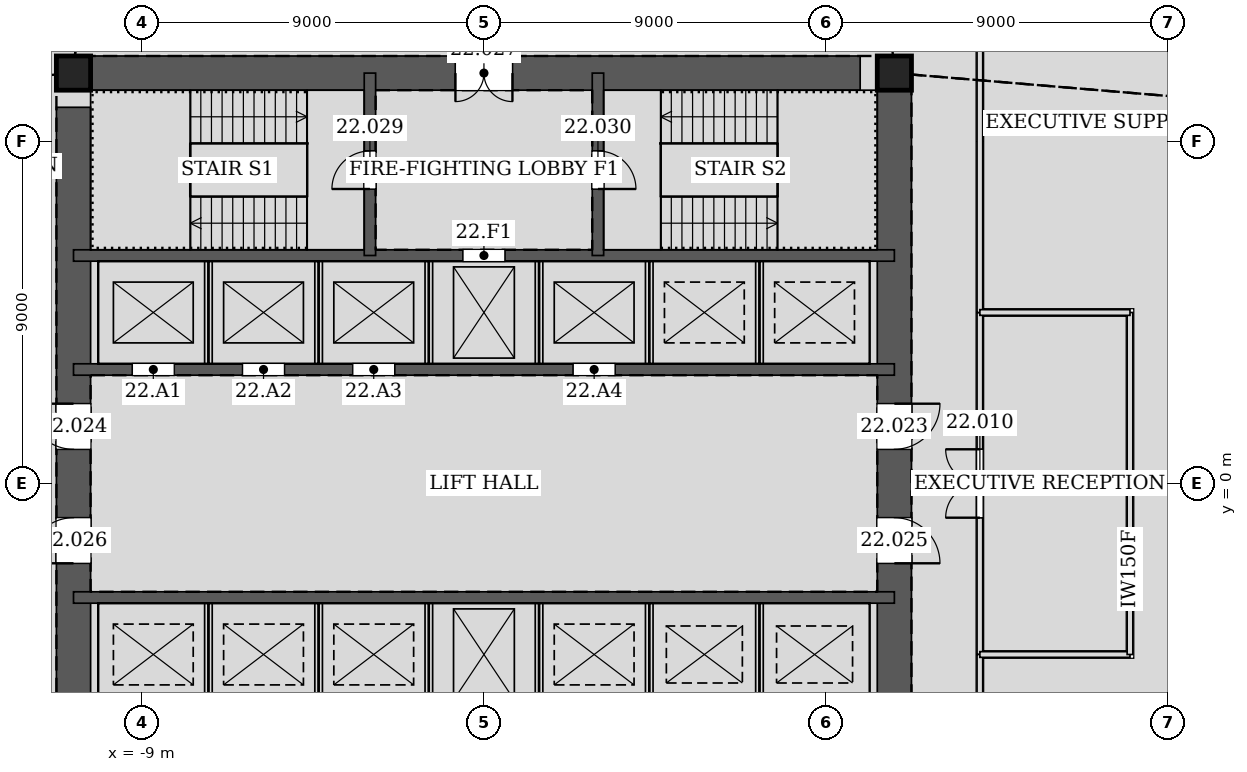
"""IFC4 building model, lengths in metres.
Left out: names, types, materials, properties, quantities, classifications, styles, units other than length and angle.
Written with IfcOpenShell. Run it as: python <this file> out.ifc"""

import sys

from ifc_helpers import new_model, si_unit, direction, frame, frame_2d, origin, origin_2d, place, context, subcontext, project, spatial, rectangle, hollow_rectangle, extrude, element, fill, save


model = new_model("IFC4")
c1 = context("Model", 3, precision=1e-05, world=origin(), true_north=direction((0.0, 1.0)))
c2 = subcontext(c1, "Body", "Model", "MODEL_VIEW")
j1 = project(units=[si_unit("LENGTHUNIT", "METRE"), si_unit("PLANEANGLEUNIT", "RADIAN")], contexts=[c1])
p1 = place(None, origin())
s1 = spatial("IfcSite", under=j1, at=p1, CompositionType="ELEMENT")
p2 = place(p1, origin())
s2 = spatial("IfcBuilding", under=s1, at=p2, CompositionType="ELEMENT")
p3 = place(p2, frame((0.0, 0.0, 100.2)))
s3 = spatial("IfcBuildingStorey", under=s2, at=p3, CompositionType="ELEMENT", Elevation=100.2)
for number, where, z_axis, x_axis in (
    (1, (10.8, 10.8, 0.0), (0.0, 0.0, 1.0), (1.0, 0.0, 0.0)),
    (2, (-10.8, 10.8, 0.0), (0.0, 0.0, 1.0), (1.0, 0.0, 0.0)),
):
    element("IfcColumn", number, at=place(p3, frame(where, z_axis=z_axis, x_axis=x_axis)), inside=s3, PredefinedType="COLUMN", context=c2, shape_type="SweptSolid", body=[
        extrude(hollow_rectangle(XDim=0.9, YDim=0.9, WallThickness=0.06, at=origin_2d()), origin(), (0.0, 0.0, 1.0), 4.2),
    ])
p4 = place(p3, frame((10.8, -10.8, 0.0), z_axis=(0.0, 0.0, 1.0), x_axis=(0.0, 1.0, 0.0)))
e3 = element("IfcWall", 3, at=p4, inside=s3, PredefinedType="SOLIDWALL", context=c2, shape_type="SweptSolid", body=[
    extrude(rectangle(XDim=21.6, YDim=0.9, at=frame_2d((10.8, 0.0))), origin(), (0.0, 0.0, 1.0), 4.2),
])
p5 = place(p4, frame((11.7, 0.0, 0.0)))
e4 = element("IfcOpeningElement", 4, at=p5, cuts=e3, PredefinedType="OPENING", context=c2, shape_type="SweptSolid", body=[
    extrude(rectangle(XDim=1.2, YDim=2.1, at=frame_2d((0.6, 1.05))), frame((0.0, 0.46, 0.0), z_axis=(0.0, -1.0, 0.0), x_axis=(1.0, 0.0, 0.0)), (0.0, 0.0, 1.0), 0.92),
])
p6 = place(p4, frame((8.7, 0.0, 0.0)))
e5 = element("IfcOpeningElement", 5, at=p6, cuts=e3, PredefinedType="OPENING", context=c2, shape_type="SweptSolid", body=[
    extrude(rectangle(XDim=1.2, YDim=2.1, at=frame_2d((0.6, 1.05))), frame((0.0, 0.46, 0.0), z_axis=(0.0, -1.0, 0.0), x_axis=(1.0, 0.0, 0.0)), (0.0, 0.0, 1.0), 0.92),
])
p7 = place(p3, frame((10.8, 10.8, 0.0), z_axis=(0.0, 0.0, 1.0), x_axis=(-1.0, 0.0, 0.0)))
e6 = element("IfcWall", 6, at=p7, inside=s3, PredefinedType="SOLIDWALL", context=c2, shape_type="SweptSolid", body=[
    extrude(rectangle(XDim=21.6, YDim=0.9, at=frame_2d((10.8, 0.0))), origin(), (0.0, 0.0, 1.0), 4.2),
])
p8 = place(p7, frame((10.05, 0.0, 0.0)))
e7 = element("IfcOpeningElement", 7, at=p8, cuts=e6, PredefinedType="OPENING", context=c2, shape_type="SweptSolid", body=[
    extrude(rectangle(XDim=1.5, YDim=2.1, at=frame_2d((0.75, 1.05))), frame((0.0, 0.46, 0.0), z_axis=(0.0, -1.0, 0.0), x_axis=(1.0, 0.0, 0.0)), (0.0, 0.0, 1.0), 0.92),
])
p9 = place(p3, frame((-10.8, 10.8, 0.0), z_axis=(0.0, 0.0, 1.0), x_axis=(0.0, -1.0, 0.0)))
e8 = element("IfcWall", 8, at=p9, inside=s3, PredefinedType="SOLIDWALL", context=c2, shape_type="SweptSolid", body=[
    extrude(rectangle(XDim=21.6, YDim=0.9, at=frame_2d((10.8, 0.0))), origin(), (0.0, 0.0, 1.0), 4.2),
])
p10 = place(p9, frame((8.7, 0.0, 0.0)))
e9 = element("IfcOpeningElement", 9, at=p10, cuts=e8, PredefinedType="OPENING", context=c2, shape_type="SweptSolid", body=[
    extrude(rectangle(XDim=1.2, YDim=2.1, at=frame_2d((0.6, 1.05))), frame((0.0, 0.46, 0.0), z_axis=(0.0, -1.0, 0.0), x_axis=(1.0, 0.0, 0.0)), (0.0, 0.0, 1.0), 0.92),
])
p11 = place(p9, frame((11.7, 0.0, 0.0)))
e10 = element("IfcOpeningElement", 10, at=p11, cuts=e8, PredefinedType="OPENING", context=c2, shape_type="SweptSolid", body=[
    extrude(rectangle(XDim=1.2, YDim=2.1, at=frame_2d((0.6, 1.05))), frame((0.0, 0.46, 0.0), z_axis=(0.0, -1.0, 0.0), x_axis=(1.0, 0.0, 0.0)), (0.0, 0.0, 1.0), 0.92),
])
p12 = place(p3, frame((-10.8, 3.0, 0.0), z_axis=(0.0, 0.0, 1.0), x_axis=(1.0, 0.0, 0.0)))
e11 = element("IfcWall", 11, at=p12, inside=s3, PredefinedType="SOLIDWALL", context=c2, shape_type="SweptSolid", body=[
    extrude(rectangle(XDim=21.6, YDim=0.3, at=frame_2d((10.8, 0.0))), origin(), (0.0, 0.0, 1.0), 4.2),
])
p13 = place(p12, frame((1.55, 0.0, 0.0)))
e12 = element("IfcOpeningElement", 12, at=p13, cuts=e11, PredefinedType="OPENING", context=c2, shape_type="SweptSolid", body=[
    extrude(rectangle(XDim=1.1, YDim=2.1, at=frame_2d((0.55, 1.05))), frame((0.0, 0.16, 0.0), z_axis=(0.0, -1.0, 0.0), x_axis=(1.0, 0.0, 0.0)), (0.0, 0.0, 1.0), 0.32),
])
p14 = place(p12, frame((4.45, 0.0, 0.0)))
e13 = element("IfcOpeningElement", 13, at=p14, cuts=e11, PredefinedType="OPENING", context=c2, shape_type="SweptSolid", body=[
    extrude(rectangle(XDim=1.1, YDim=2.1, at=frame_2d((0.55, 1.05))), frame((0.0, 0.16, 0.0), z_axis=(0.0, -1.0, 0.0), x_axis=(1.0, 0.0, 0.0)), (0.0, 0.0, 1.0), 0.32),
])
p15 = place(p12, frame((7.35, 0.0, 0.0)))
e14 = element("IfcOpeningElement", 14, at=p15, cuts=e11, PredefinedType="OPENING", context=c2, shape_type="SweptSolid", body=[
    extrude(rectangle(XDim=1.1, YDim=2.1, at=frame_2d((0.55, 1.05))), frame((0.0, 0.16, 0.0), z_axis=(0.0, -1.0, 0.0), x_axis=(1.0, 0.0, 0.0)), (0.0, 0.0, 1.0), 0.32),
])
p16 = place(p12, frame((13.15, 0.0, 0.0)))
e15 = element("IfcOpeningElement", 15, at=p16, cuts=e11, PredefinedType="OPENING", context=c2, shape_type="SweptSolid", body=[
    extrude(rectangle(XDim=1.1, YDim=2.1, at=frame_2d((0.55, 1.05))), frame((0.0, 0.16, 0.0), z_axis=(0.0, -1.0, 0.0), x_axis=(1.0, 0.0, 0.0)), (0.0, 0.0, 1.0), 0.32),
])
p17 = place(p3, frame((-10.8, 6.0, 0.0), z_axis=(0.0, 0.0, 1.0), x_axis=(1.0, 0.0, 0.0)))
e16 = element("IfcWall", 16, at=p17, inside=s3, PredefinedType="SOLIDWALL", context=c2, shape_type="SweptSolid", body=[
    extrude(rectangle(XDim=21.6, YDim=0.3, at=frame_2d((10.8, 0.0))), origin(), (0.0, 0.0, 1.0), 4.2),
])
p18 = place(p17, frame((10.25, 0.0, 0.0)))
e17 = element("IfcOpeningElement", 17, at=p18, cuts=e16, PredefinedType="OPENING", context=c2, shape_type="SweptSolid", body=[
    extrude(rectangle(XDim=1.1, YDim=2.1, at=frame_2d((0.55, 1.05))), frame((0.0, 0.16, 0.0), z_axis=(0.0, -1.0, 0.0), x_axis=(1.0, 0.0, 0.0)), (0.0, 0.0, 1.0), 0.32),
])
p19 = place(p3, frame((-3.0, 6.0, 0.0), z_axis=(0.0, 0.0, 1.0), x_axis=(0.0, 1.0, 0.0)))
e18 = element("IfcWall", 18, at=p19, inside=s3, PredefinedType="SOLIDWALL", context=c2, shape_type="SweptSolid", body=[
    extrude(rectangle(XDim=4.8, YDim=0.3, at=frame_2d((2.4, 0.0))), origin(), (0.0, 0.0, 1.0), 4.2),
])
p20 = place(p19, frame((1.75, 0.0, 0.0)))
e19 = element("IfcOpeningElement", 19, at=p20, cuts=e18, PredefinedType="OPENING", context=c2, shape_type="SweptSolid", body=[
    extrude(rectangle(XDim=1.0, YDim=2.1, at=frame_2d((0.5, 1.05))), frame((0.0, 0.16, 0.0), z_axis=(0.0, -1.0, 0.0), x_axis=(1.0, 0.0, 0.0)), (0.0, 0.0, 1.0), 0.32),
])
p21 = place(p3, frame((3.0, 6.0, 0.0), z_axis=(0.0, 0.0, 1.0), x_axis=(0.0, 1.0, 0.0)))
e20 = element("IfcWall", 20, at=p21, inside=s3, PredefinedType="SOLIDWALL", context=c2, shape_type="SweptSolid", body=[
    extrude(rectangle(XDim=4.8, YDim=0.3, at=frame_2d((2.4, 0.0))), origin(), (0.0, 0.0, 1.0), 4.2),
])
p22 = place(p21, frame((1.75, 0.0, 0.0)))
e21 = element("IfcOpeningElement", 21, at=p22, cuts=e20, PredefinedType="OPENING", context=c2, shape_type="SweptSolid", body=[
    extrude(rectangle(XDim=1.0, YDim=2.1, at=frame_2d((0.5, 1.05))), frame((0.0, 0.16, 0.0), z_axis=(0.0, -1.0, 0.0), x_axis=(1.0, 0.0, 0.0)), (0.0, 0.0, 1.0), 0.32),
])
p23 = place(p3, frame((-10.8, -3.0, 0.0), z_axis=(0.0, 0.0, 1.0), x_axis=(1.0, 0.0, 0.0)))
e22 = element("IfcWall", 22, at=p23, inside=s3, PredefinedType="SOLIDWALL", context=c2, shape_type="SweptSolid", body=[
    extrude(rectangle(XDim=21.6, YDim=0.3, at=frame_2d((10.8, 0.0))), origin(), (0.0, 0.0, 1.0), 4.2),
])
p24 = place(p3, frame((13.05, -4.501, 0.0), z_axis=(0.0, 0.0, 1.0), x_axis=(0.0, 1.0, 0.0)))
e23 = element("IfcWall", 23, at=p24, inside=s3, PredefinedType="PARTITIONING", context=c2, shape_type="SweptSolid", body=[
    extrude(rectangle(XDim=9.002, YDim=0.15, at=frame_2d((4.501, 0.0))), origin(), (0.0, 0.0, 1.0), 2.64),
])
p25 = place(p24, frame((3.601, 0.0, 0.0)))
e24 = element("IfcOpeningElement", 24, at=p25, cuts=e23, PredefinedType="OPENING", context=c2, shape_type="SweptSolid", body=[
    extrude(rectangle(XDim=1.8, YDim=2.4, at=frame_2d((0.9, 1.2))), frame((0.0, 0.085, 0.0), z_axis=(0.0, -1.0, 0.0), x_axis=(1.0, 0.0, 0.0)), (0.0, 0.0, 1.0), 0.17),
])
for number, where, z_axis, x_axis in (
    (25, (13.05, 4.499, 0.0), (0.0, 0.0, 1.0), (0.0, 1.0, 0.0)),
    (26, (13.05, -13.05, 0.0), (0.0, 0.0, 1.0), (0.0, 1.0, 0.0)),
):
    element("IfcWall", number, at=place(p3, frame(where, z_axis=z_axis, x_axis=x_axis)), inside=s3, PredefinedType="PARTITIONING", context=c2, shape_type="SweptSolid", body=[
        extrude(rectangle(XDim=8.551, YDim=0.15, at=frame_2d((4.275, 0.0))), origin(), (0.0, 0.0, 1.0), 2.84),
    ])
p26 = place(p3, frame((17.0, -0.001, 0.0), z_axis=(0.0, 0.0, 1.0), x_axis=(0.0, 1.0, 0.0)))
e27 = element("IfcWall", 27, at=p26, inside=s3, PredefinedType="PARTITIONING", context=c2, shape_type="SweptSolid", body=[
    extrude(rectangle(XDim=4.501, YDim=0.15, at=frame_2d((2.25, 0.0))), origin(), (0.0, 0.0, 1.0), 2.64),
])
for number, where, z_axis, x_axis in (
    (28, (17.0, 4.5, 0.0), (0.0, 0.0, 1.0), (-1.0, 0.0, 0.0)),
    (29, (13.05, -4.5, 0.0), (0.0, 0.0, 1.0), (1.0, 0.0, 0.0)),
):
    element("IfcWall", number, at=place(p3, frame(where, z_axis=z_axis, x_axis=x_axis)), inside=s3, PredefinedType="PARTITIONING", context=c2, shape_type="SweptSolid", body=[
        extrude(rectangle(XDim=3.95, YDim=0.15, at=frame_2d((1.975, 0.0))), origin(), (0.0, 0.0, 1.0), 3.028),
    ])
p27 = place(p3, frame((17.0, -4.5, 0.0), z_axis=(0.0, 0.0, 1.0), x_axis=(0.0, 1.0, 0.0)))
e30 = element("IfcWall", 30, at=p27, inside=s3, PredefinedType="PARTITIONING", context=c2, shape_type="SweptSolid", body=[
    extrude(rectangle(XDim=4.501, YDim=0.15, at=frame_2d((2.25, 0.0))), origin(), (0.0, 0.0, 1.0), 2.64),
])
p28 = place(p3, frame((17.0, 0.0, 0.0), z_axis=(0.0, 0.0, 1.0), x_axis=(1.0, 0.0, 0.0)))
e31 = element("IfcWall", 31, at=p28, inside=s3, PredefinedType="PARTITIONING", context=c2, shape_type="SweptSolid", body=[
    extrude(rectangle(XDim=6.992, YDim=0.15, at=frame_2d((3.496, 0.0))), origin(), (0.0, 0.0, 1.0), 2.64),
])
for number, where, z_axis, x_axis in (
    (32, (-7.25, 3.15, 0.0), (0.0, 0.0, 1.0), (0.0, 1.0, 0.0)),
    (33, (-4.35, 3.15, 0.0), (0.0, 0.0, 1.0), (0.0, 1.0, 0.0)),
    (34, (-1.45, 3.15, 0.0), (0.0, 0.0, 1.0), (0.0, 1.0, 0.0)),
    (35, (1.45, 3.15, 0.0), (0.0, 0.0, 1.0), (0.0, 1.0, 0.0)),
    (36, (4.35, 3.15, 0.0), (0.0, 0.0, 1.0), (0.0, 1.0, 0.0)),
):
    element("IfcWall", number, at=place(p3, frame(where, z_axis=z_axis, x_axis=x_axis)), inside=s3, PredefinedType="PARTITIONING", context=c2, shape_type="SweptSolid", body=[
        extrude(rectangle(XDim=2.7, YDim=0.2, at=frame_2d((1.35, 0.0))), origin(), (0.0, 0.0, 1.0), 3.95),
    ])
for number, where, z_axis, x_axis in (
    (37, (7.25, 3.15, 0.0), (0.0, 0.0, 1.0), (0.0, 1.0, 0.0)),
    (38, (-7.25, -5.85, 0.0), (0.0, 0.0, 1.0), (0.0, 1.0, 0.0)),
    (39, (-4.35, -5.85, 0.0), (0.0, 0.0, 1.0), (0.0, 1.0, 0.0)),
    (40, (-1.45, -5.85, 0.0), (0.0, 0.0, 1.0), (0.0, 1.0, 0.0)),
    (41, (1.45, -5.85, 0.0), (0.0, 0.0, 1.0), (0.0, 1.0, 0.0)),
    (42, (4.35, -5.85, 0.0), (0.0, 0.0, 1.0), (0.0, 1.0, 0.0)),
    (43, (7.25, -5.85, 0.0), (0.0, 0.0, 1.0), (0.0, 1.0, 0.0)),
):
    element("IfcWall", number, at=place(p3, frame(where, z_axis=z_axis, x_axis=x_axis)), inside=s3, PredefinedType="PARTITIONING", context=c2, shape_type="SweptSolid", body=[
        extrude(rectangle(XDim=2.7, YDim=0.2, at=frame_2d((1.35, 0.0))), origin(), (0.0, 0.0, 1.0), 4.2),
    ])
p29 = place(p25, origin())
e44 = element("IfcDoor", 44, at=p29, inside=s3, OperationType="DOUBLE_DOOR_SINGLE_SWING", PredefinedType="DOOR", context=c2, shape_type="SweptSolid", body=[
    extrude(rectangle(XDim=1.8, YDim=2.4, at=frame_2d((0.9, 1.2))), frame((0.0, 0.025, 0.0), z_axis=(0.0, -1.0, 0.0), x_axis=(1.0, 0.0, 0.0)), (0.0, 0.0, 1.0), 0.05),
])
fill(e24, e44)
p30 = place(p5, frame((1.2, 0.0, 0.0), z_axis=(0.0, 0.0, 1.0), x_axis=(-1.0, 0.0, 0.0)))
e45 = element("IfcDoor", 45, at=p30, inside=s3, OperationType="SINGLE_SWING_LEFT", PredefinedType="DOOR", context=c2, shape_type="SweptSolid", body=[
    extrude(rectangle(XDim=1.2, YDim=2.1, at=frame_2d((0.6, 1.05))), frame((0.0, 0.025, 0.0), z_axis=(0.0, -1.0, 0.0), x_axis=(1.0, 0.0, 0.0)), (0.0, 0.0, 1.0), 0.05),
])
fill(e4, e45)
p31 = place(p10, frame((1.2, 0.0, 0.0), z_axis=(0.0, 0.0, 1.0), x_axis=(-1.0, 0.0, 0.0)))
e46 = element("IfcDoor", 46, at=p31, inside=s3, OperationType="SINGLE_SWING_RIGHT", PredefinedType="DOOR", context=c2, shape_type="SweptSolid", body=[
    extrude(rectangle(XDim=1.2, YDim=2.1, at=frame_2d((0.6, 1.05))), frame((0.0, 0.025, 0.0), z_axis=(0.0, -1.0, 0.0), x_axis=(1.0, 0.0, 0.0)), (0.0, 0.0, 1.0), 0.05),
])
fill(e9, e46)
p32 = place(p6, frame((1.2, 0.0, 0.0), z_axis=(0.0, 0.0, 1.0), x_axis=(-1.0, 0.0, 0.0)))
e47 = element("IfcDoor", 47, at=p32, inside=s3, OperationType="SINGLE_SWING_RIGHT", PredefinedType="DOOR", context=c2, shape_type="SweptSolid", body=[
    extrude(rectangle(XDim=1.2, YDim=2.1, at=frame_2d((0.6, 1.05))), frame((0.0, 0.025, 0.0), z_axis=(0.0, -1.0, 0.0), x_axis=(1.0, 0.0, 0.0)), (0.0, 0.0, 1.0), 0.05),
])
fill(e5, e47)
p33 = place(p11, frame((1.2, 0.0, 0.0), z_axis=(0.0, 0.0, 1.0), x_axis=(-1.0, 0.0, 0.0)))
e48 = element("IfcDoor", 48, at=p33, inside=s3, OperationType="SINGLE_SWING_LEFT", PredefinedType="DOOR", context=c2, shape_type="SweptSolid", body=[
    extrude(rectangle(XDim=1.2, YDim=2.1, at=frame_2d((0.6, 1.05))), frame((0.0, 0.025, 0.0), z_axis=(0.0, -1.0, 0.0), x_axis=(1.0, 0.0, 0.0)), (0.0, 0.0, 1.0), 0.05),
])
fill(e10, e48)
p34 = place(p8, origin())
e49 = element("IfcDoor", 49, at=p34, inside=s3, OperationType="DOUBLE_DOOR_SINGLE_SWING", PredefinedType="DOOR", context=c2, shape_type="SweptSolid", body=[
    extrude(rectangle(XDim=1.5, YDim=2.1, at=frame_2d((0.75, 1.05))), frame((0.0, 0.025, 0.0), z_axis=(0.0, -1.0, 0.0), x_axis=(1.0, 0.0, 0.0)), (0.0, 0.0, 1.0), 0.05),
])
fill(e7, e49)
p35 = place(p20, origin())
e50 = element("IfcDoor", 50, at=p35, inside=s3, OperationType="SINGLE_SWING_LEFT", PredefinedType="DOOR", context=c2, shape_type="SweptSolid", body=[
    extrude(rectangle(XDim=1.0, YDim=2.1, at=frame_2d((0.5, 1.05))), frame((0.0, 0.025, 0.0), z_axis=(0.0, -1.0, 0.0), x_axis=(1.0, 0.0, 0.0)), (0.0, 0.0, 1.0), 0.05),
])
fill(e19, e50)
p36 = place(p22, frame((1.0, 0.0, 0.0), z_axis=(0.0, 0.0, 1.0), x_axis=(-1.0, 0.0, 0.0)))
e51 = element("IfcDoor", 51, at=p36, inside=s3, OperationType="SINGLE_SWING_RIGHT", PredefinedType="DOOR", context=c2, shape_type="SweptSolid", body=[
    extrude(rectangle(XDim=1.0, YDim=2.1, at=frame_2d((0.5, 1.05))), frame((0.0, 0.025, 0.0), z_axis=(0.0, -1.0, 0.0), x_axis=(1.0, 0.0, 0.0)), (0.0, 0.0, 1.0), 0.05),
])
fill(e21, e51)
p37 = place(p13, origin())
e52 = element("IfcDoor", 52, at=p37, inside=s3, OperationType="DOUBLE_DOOR_SLIDING", PredefinedType="DOOR", context=c2, shape_type="SweptSolid", body=[
    extrude(rectangle(XDim=1.1, YDim=2.1, at=frame_2d((0.55, 1.05))), frame((0.0, 0.025, 0.0), z_axis=(0.0, -1.0, 0.0), x_axis=(1.0, 0.0, 0.0)), (0.0, 0.0, 1.0), 0.05),
])
fill(e12, e52)
p38 = place(p14, origin())
e53 = element("IfcDoor", 53, at=p38, inside=s3, OperationType="DOUBLE_DOOR_SLIDING", PredefinedType="DOOR", context=c2, shape_type="SweptSolid", body=[
    extrude(rectangle(XDim=1.1, YDim=2.1, at=frame_2d((0.55, 1.05))), frame((0.0, 0.025, 0.0), z_axis=(0.0, -1.0, 0.0), x_axis=(1.0, 0.0, 0.0)), (0.0, 0.0, 1.0), 0.05),
])
fill(e13, e53)
p39 = place(p15, origin())
e54 = element("IfcDoor", 54, at=p39, inside=s3, OperationType="DOUBLE_DOOR_SLIDING", PredefinedType="DOOR", context=c2, shape_type="SweptSolid", body=[
    extrude(rectangle(XDim=1.1, YDim=2.1, at=frame_2d((0.55, 1.05))), frame((0.0, 0.025, 0.0), z_axis=(0.0, -1.0, 0.0), x_axis=(1.0, 0.0, 0.0)), (0.0, 0.0, 1.0), 0.05),
])
fill(e14, e54)
p40 = place(p18, origin())
e55 = element("IfcDoor", 55, at=p40, inside=s3, OperationType="DOUBLE_DOOR_SLIDING", PredefinedType="DOOR", context=c2, shape_type="SweptSolid", body=[
    extrude(rectangle(XDim=1.1, YDim=2.1, at=frame_2d((0.55, 1.05))), frame((0.0, 0.025, 0.0), z_axis=(0.0, -1.0, 0.0), x_axis=(1.0, 0.0, 0.0)), (0.0, 0.0, 1.0), 0.05),
])
fill(e17, e55)
p41 = place(p16, origin())
e56 = element("IfcDoor", 56, at=p41, inside=s3, OperationType="DOUBLE_DOOR_SLIDING", PredefinedType="DOOR", context=c2, shape_type="SweptSolid", body=[
    extrude(rectangle(XDim=1.1, YDim=2.1, at=frame_2d((0.55, 1.05))), frame((0.0, 0.025, 0.0), z_axis=(0.0, -1.0, 0.0), x_axis=(1.0, 0.0, 0.0)), (0.0, 0.0, 1.0), 0.05),
])
fill(e15, e56)
save(model, sys.argv[1])
